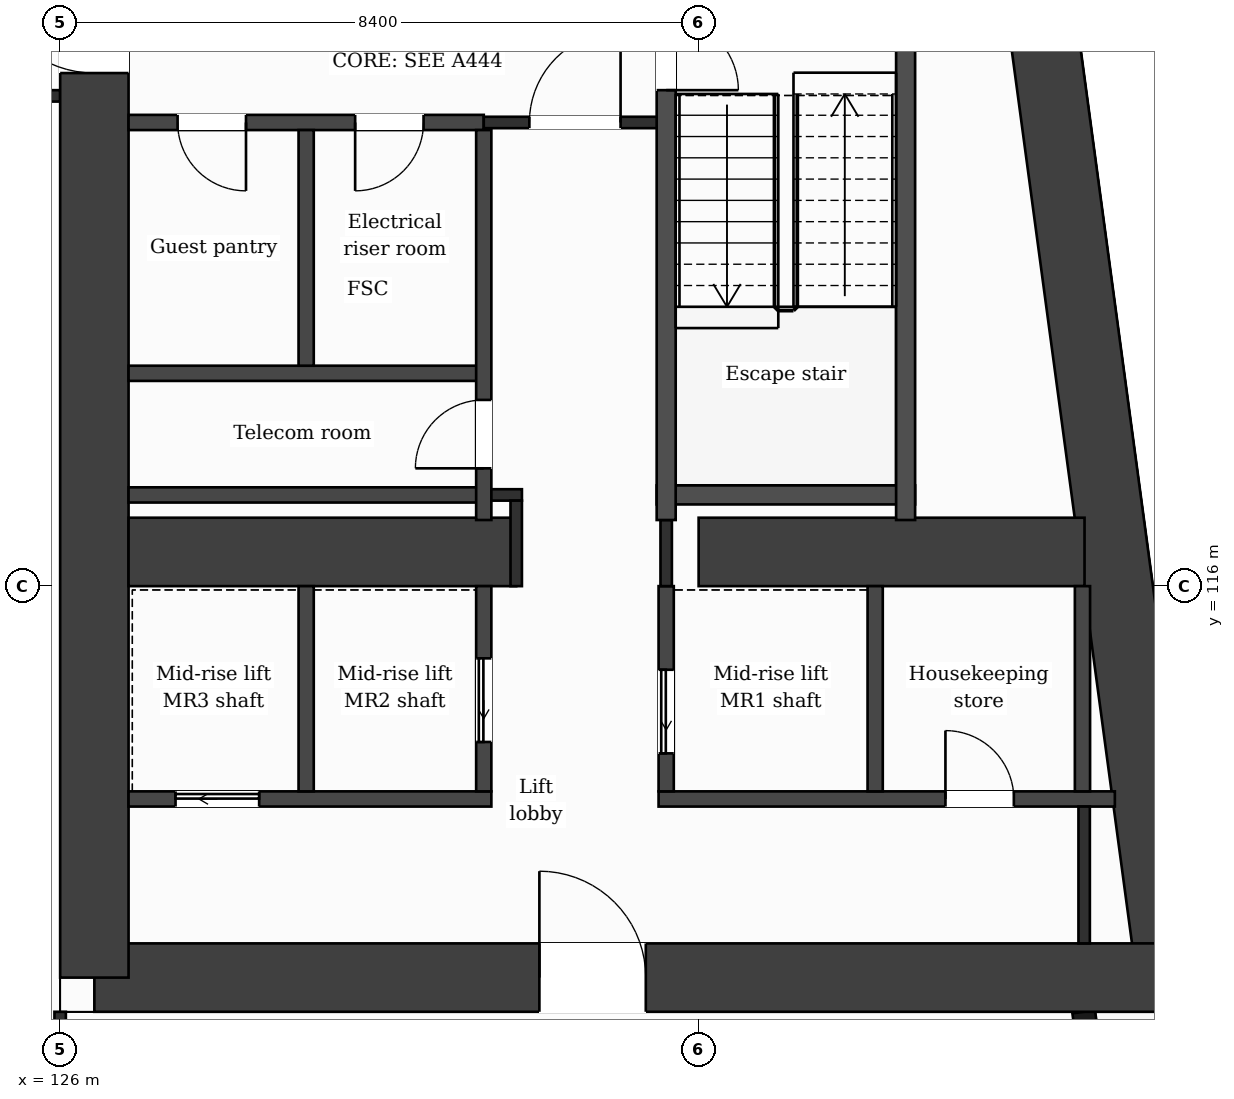
"""IFC4 building model, lengths in metres.
Left out: names, types, materials, properties, quantities, classifications, styles, units other than length and angle.
Written with IfcOpenShell. Run it as: python <this file> out.ifc"""

import sys

from ifc_helpers import new_model, si_unit, direction, frame, frame_2d, origin, place, context, subcontext, project, spatial, rectangle, extrude, element, fill, save


model = new_model("IFC4")
c1 = context("Model", 3, precision=1e-05, world=origin(), true_north=direction((0.0, 1.0)))
c2 = subcontext(c1, "Body", "Model", "MODEL_VIEW")
j1 = project(units=[si_unit("LENGTHUNIT", "METRE"), si_unit("PLANEANGLEUNIT", "RADIAN")], contexts=[c1])
p1 = place(None, origin())
s1 = spatial("IfcSite", under=j1, at=p1, CompositionType="ELEMENT")
p2 = place(p1, origin())
s2 = spatial("IfcBuilding", under=s1, at=p2, CompositionType="ELEMENT")
p3 = place(p2, frame((0.0, 0.0, 181.1)))
s3 = spatial("IfcBuildingStorey", under=s2, at=p3, CompositionType="ELEMENT", Elevation=181.1)
p4 = place(p3, frame((137.776, 131.95, 0.0), z_axis=(0.0, 0.0, 1.0), x_axis=(0.133421759112, -0.991059349482, 0.0)))
e1 = element("IfcWall", 1, at=p4, inside=s3, PredefinedType="SHEAR", context=c2, shape_type="SweptSolid", body=[
    extrude(rectangle(XDim=21.29, YDim=0.9, at=frame_2d((10.645, 0.0))), origin(), (0.0, 0.0, 1.0), 3.7),
])
p5 = place(p3, frame((140.616, 110.85, 0.0), z_axis=(0.0, 0.0, 1.0), x_axis=(-1.0, 0.0, 0.0)))
e2 = element("IfcWall", 2, at=p5, inside=s3, PredefinedType="SHEAR", context=c2, shape_type="SweptSolid", body=[
    extrude(rectangle(XDim=14.166, YDim=0.9, at=frame_2d((7.083, 0.0))), origin(), (0.0, 0.0, 1.0), 3.7),
])
p6 = place(p5, frame((6.911, 0.0, 0.0)))
e3 = element("IfcOpeningElement", 3, at=p6, cuts=e2, PredefinedType="OPENING", context=c2, shape_type="SweptSolid", body=[
    extrude(rectangle(XDim=1.4, YDim=2.1, at=frame_2d((0.7, 1.05))), frame((0.0, 0.46, 0.0), z_axis=(0.0, -1.0, 0.0), x_axis=(1.0, 0.0, 0.0)), (0.0, 0.0, 1.0), 0.92),
])
p7 = place(p3, frame((126.45, 110.85, 0.0), z_axis=(0.0, 0.0, 1.0), x_axis=(0.0, 1.0, 0.0)))
e4 = element("IfcWall", 4, at=p7, inside=s3, PredefinedType="SHEAR", context=c2, shape_type="SweptSolid", body=[
    extrude(rectangle(XDim=21.1, YDim=0.9, at=frame_2d((10.55, 0.0))), origin(), (0.0, 0.0, 1.0), 3.7),
])
p8 = place(p7, frame((11.9, 0.0, 0.0)))
e5 = element("IfcOpeningElement", 5, at=p8, cuts=e4, PredefinedType="OPENING", context=c2, shape_type="SweptSolid", body=[
    extrude(rectangle(XDim=1.4, YDim=2.1, at=frame_2d((0.7, 1.05))), frame((0.0, 0.46, 0.0), z_axis=(0.0, -1.0, 0.0), x_axis=(1.0, 0.0, 0.0)), (0.0, 0.0, 1.0), 0.92),
])
p9 = place(p3, frame((126.9, 116.45, 0.0), z_axis=(0.0, 0.0, 1.0), x_axis=(1.0, 0.0, 0.0)))
e6 = element("IfcWall", 6, at=p9, inside=s3, PredefinedType="SHEAR", context=c2, shape_type="SweptSolid", body=[
    extrude(rectangle(XDim=5.1, YDim=0.9, at=frame_2d((2.55, 0.0))), origin(), (0.0, 0.0, 1.0), 3.7),
])
p10 = place(p3, frame((134.4, 116.45, 0.0), z_axis=(0.0, 0.0, 1.0), x_axis=(1.0, 0.0, 0.0)))
e7 = element("IfcWall", 7, at=p10, inside=s3, PredefinedType="SHEAR", context=c2, shape_type="SweptSolid", body=[
    extrude(rectangle(XDim=5.077, YDim=0.9, at=frame_2d((2.539, 0.0))), origin(), (0.0, 0.0, 1.0), 3.7),
])
p11 = place(p3, frame((140.348, 103.85, 0.0), z_axis=(0.0, 0.0, 1.0), x_axis=(-0.133431549479, 0.991058031401, 0.0)))
e8 = element("IfcWall", 8, at=p11, inside=s3, PredefinedType="SOLIDWALL", context=c2, shape_type="SweptSolid", body=[
    extrude(rectangle(XDim=6.609, YDim=0.3, at=frame_2d((3.304, 0.0))), origin(), (0.0, 0.0, 1.0), 3.38),
])
p12 = place(p11, frame((0.737, 0.0, 0.9)))
e9 = element("IfcOpeningElement", 9, at=p12, cuts=e8, PredefinedType="OPENING", context=c2, shape_type="SweptSolid", body=[
    extrude(rectangle(XDim=1.2, YDim=2.1, at=frame_2d((0.6, 1.05))), frame((0.0, 0.16, 0.0), z_axis=(0.0, -1.0, 0.0), x_axis=(1.0, 0.0, 0.0)), (0.0, 0.0, 1.0), 0.32),
])
p13 = place(p11, frame((3.991, 0.0, 0.0)))
e10 = element("IfcOpeningElement", 10, at=p13, cuts=e8, PredefinedType="OPENING", context=c2, shape_type="SweptSolid", body=[
    extrude(rectangle(XDim=1.2, YDim=2.4, at=frame_2d((0.6, 1.2))), frame((0.0, 0.16, 0.0), z_axis=(0.0, -1.0, 0.0), x_axis=(1.0, 0.0, 0.0)), (0.0, 0.0, 1.0), 0.32),
])
p14 = place(p3, frame((126.9, 113.2, 0.0), z_axis=(0.0, 0.0, 1.0), x_axis=(1.0, 0.0, 0.0)))
e11 = element("IfcWall", 11, at=p14, inside=s3, PredefinedType="PARTITIONING", context=c2, shape_type="SweptSolid", body=[
    extrude(rectangle(XDim=4.773, YDim=0.2, at=frame_2d((2.387, 0.0))), origin(), (0.0, 0.0, 1.0), 3.38),
])
p15 = place(p14, frame((0.618, 0.0, 0.0)))
e12 = element("IfcOpeningElement", 12, at=p15, cuts=e11, PredefinedType="OPENING", context=c2, shape_type="SweptSolid", body=[
    extrude(rectangle(XDim=1.1, YDim=2.1, at=frame_2d((0.55, 1.05))), frame((0.0, 0.11, 0.0), z_axis=(0.0, -1.0, 0.0), x_axis=(1.0, 0.0, 0.0)), (0.0, 0.0, 1.0), 0.22),
])
p16 = place(p3, frame((133.873, 113.2, 0.0), z_axis=(0.0, 0.0, 1.0), x_axis=(1.0, 0.0, 0.0)))
e13 = element("IfcWall", 13, at=p16, inside=s3, PredefinedType="PARTITIONING", context=c2, shape_type="SweptSolid", body=[
    extrude(rectangle(XDim=6.003, YDim=0.2, at=frame_2d((3.001, 0.0))), origin(), (0.0, 0.0, 1.0), 3.38),
])
p17 = place(p16, frame((3.774, 0.0, 0.0)))
e14 = element("IfcOpeningElement", 14, at=p17, cuts=e13, PredefinedType="OPENING", context=c2, shape_type="SweptSolid", body=[
    extrude(rectangle(XDim=0.9, YDim=2.1, at=frame_2d((0.45, 1.05))), frame((0.0, 0.11, 0.0), z_axis=(0.0, -1.0, 0.0), x_axis=(1.0, 0.0, 0.0)), (0.0, 0.0, 1.0), 0.22),
])
p18 = place(p3, frame((126.9, 117.2, 0.0), z_axis=(0.0, 0.0, 1.0), x_axis=(1.0, 0.0, 0.0)))
e15 = element("IfcWall", 15, at=p18, inside=s3, PredefinedType="PARTITIONING", context=c2, shape_type="SweptSolid", body=[
    extrude(rectangle(XDim=4.673, YDim=0.2, at=frame_2d((2.336, 0.0))), origin(), (0.0, 0.0, 1.0), 3.38),
])
p19 = place(p3, frame((131.573, 117.2, 0.0), z_axis=(0.0, 0.0, 1.0), x_axis=(1.0, 0.0, 0.0)))
e16 = element("IfcWall", 16, at=p19, inside=s3, PredefinedType="PARTITIONING", context=c2, shape_type="SweptSolid", body=[
    extrude(rectangle(XDim=0.502, YDim=0.15, at=frame_2d((0.251, 0.0))), origin(), (0.0, 0.0, 1.0), 3.38),
])
p20 = place(p3, frame((133.848, 117.2, 0.0), z_axis=(0.0, 0.0, 1.0), x_axis=(1.0, 0.0, 0.0)))
e17 = element("IfcWall", 17, at=p20, inside=s3, PredefinedType="PARTITIONING", context=c2, shape_type="SweptSolid", body=[
    extrude(rectangle(XDim=3.4, YDim=0.25, at=frame_2d((1.7, 0.0))), origin(), (0.0, 0.0, 1.0), 3.38),
])
p21 = place(p3, frame((126.9, 118.8, 0.0), z_axis=(0.0, 0.0, 1.0), x_axis=(1.0, 0.0, 0.0)))
e18 = element("IfcWall", 18, at=p21, inside=s3, PredefinedType="PARTITIONING", context=c2, shape_type="SweptSolid", body=[
    extrude(rectangle(XDim=4.673, YDim=0.2, at=frame_2d((2.336, 0.0))), origin(), (0.0, 0.0, 1.0), 3.38),
])
p22 = place(p3, frame((126.9, 122.1, 0.0), z_axis=(0.0, 0.0, 1.0), x_axis=(1.0, 0.0, 0.0)))
e19 = element("IfcWall", 19, at=p22, inside=s3, PredefinedType="PARTITIONING", context=c2, shape_type="SweptSolid", body=[
    extrude(rectangle(XDim=4.673, YDim=0.2, at=frame_2d((2.336, 0.0))), origin(), (0.0, 0.0, 1.0), 3.38),
])
p23 = place(p22, frame((2.981, 0.0, 0.0)))
e20 = element("IfcOpeningElement", 20, at=p23, cuts=e19, PredefinedType="OPENING", context=c2, shape_type="SweptSolid", body=[
    extrude(rectangle(XDim=0.9, YDim=2.1, at=frame_2d((0.45, 1.05))), frame((0.0, 0.11, 0.0), z_axis=(0.0, -1.0, 0.0), x_axis=(1.0, 0.0, 0.0)), (0.0, 0.0, 1.0), 0.22),
])
p24 = place(p22, frame((0.645, 0.0, 0.0)))
e21 = element("IfcOpeningElement", 21, at=p24, cuts=e19, PredefinedType="OPENING", context=c2, shape_type="SweptSolid", body=[
    extrude(rectangle(XDim=0.9, YDim=2.1, at=frame_2d((0.45, 1.05))), frame((0.0, 0.11, 0.0), z_axis=(0.0, -1.0, 0.0), x_axis=(1.0, 0.0, 0.0)), (0.0, 0.0, 1.0), 0.22),
])
p25 = place(p3, frame((131.573, 122.1, 0.0), z_axis=(0.0, 0.0, 1.0), x_axis=(1.0, 0.0, 0.0)))
e22 = element("IfcWall", 22, at=p25, inside=s3, PredefinedType="PARTITIONING", context=c2, shape_type="SweptSolid", body=[
    extrude(rectangle(XDim=2.4, YDim=0.15, at=frame_2d((1.2, 0.0))), origin(), (0.0, 0.0, 1.0), 3.38),
])
p26 = place(p25, frame((0.6, 0.0, 0.0)))
e23 = element("IfcOpeningElement", 23, at=p26, cuts=e22, PredefinedType="OPENING", context=c2, shape_type="SweptSolid", body=[
    extrude(rectangle(XDim=1.2, YDim=2.1, at=frame_2d((0.6, 1.05))), frame((0.0, 0.085, 0.0), z_axis=(0.0, -1.0, 0.0), x_axis=(1.0, 0.0, 0.0)), (0.0, 0.0, 1.0), 0.17),
])
p27 = place(p3, frame((100.8, 122.45, 0.0), z_axis=(0.0, 0.0, 1.0), x_axis=(1.0, 0.0, 0.0)))
e24 = element("IfcWall", 24, at=p27, inside=s3, PredefinedType="PARTITIONING", context=c2, shape_type="SweptSolid", body=[
    extrude(rectangle(XDim=25.2, YDim=0.15, at=frame_2d((12.6, 0.0))), origin(), (0.0, 0.0, 1.0), 3.38),
])
p28 = place(p3, frame((126.0, 109.075, 0.0), z_axis=(0.0, 0.0, 1.0), x_axis=(0.0, 1.0, 0.0)))
e25 = element("IfcWall", 25, at=p28, inside=s3, PredefinedType="PARTITIONING", context=c2, shape_type="SweptSolid", body=[
    extrude(rectangle(XDim=1.325, YDim=0.15, at=frame_2d((0.663, 0.0))), origin(), (0.0, 0.0, 1.0), 3.38),
])
p29 = place(p3, frame((129.237, 113.3, 0.0), z_axis=(0.0, 0.0, 1.0), x_axis=(0.0, 1.0, 0.0)))
e26 = element("IfcWall", 26, at=p29, inside=s3, PredefinedType="PARTITIONING", context=c2, shape_type="SweptSolid", body=[
    extrude(rectangle(XDim=2.7, YDim=0.2, at=frame_2d((1.35, 0.0))), origin(), (0.0, 0.0, 1.0), 3.38),
])
p30 = place(p3, frame((129.237, 118.9, 0.0), z_axis=(0.0, 0.0, 1.0), x_axis=(0.0, 1.0, 0.0)))
e27 = element("IfcWall", 27, at=p30, inside=s3, PredefinedType="PARTITIONING", context=c2, shape_type="SweptSolid", body=[
    extrude(rectangle(XDim=3.1, YDim=0.2, at=frame_2d((1.55, 0.0))), origin(), (0.0, 0.0, 1.0), 3.38),
])
p31 = place(p3, frame((131.573, 113.3, 0.0), z_axis=(0.0, 0.0, 1.0), x_axis=(0.0, 1.0, 0.0)))
e28 = element("IfcWall", 28, at=p31, inside=s3, PredefinedType="PARTITIONING", context=c2, shape_type="SweptSolid", body=[
    extrude(rectangle(XDim=2.7, YDim=0.2, at=frame_2d((1.35, 0.0))), origin(), (0.0, 0.0, 1.0), 3.38),
])
p32 = place(p31, frame((0.65, 0.0, 0.0)))
e29 = element("IfcOpeningElement", 29, at=p32, cuts=e28, PredefinedType="OPENING", context=c2, shape_type="SweptSolid", body=[
    extrude(rectangle(XDim=1.1, YDim=2.1, at=frame_2d((0.55, 1.05))), frame((0.0, 0.11, 0.0), z_axis=(0.0, -1.0, 0.0), x_axis=(1.0, 0.0, 0.0)), (0.0, 0.0, 1.0), 0.22),
])
p33 = place(p3, frame((131.573, 116.87, 0.0), z_axis=(0.0, 0.0, 1.0), x_axis=(0.0, 1.0, 0.0)))
e30 = element("IfcWall", 30, at=p33, inside=s3, PredefinedType="PARTITIONING", context=c2, shape_type="SweptSolid", body=[
    extrude(rectangle(XDim=5.13, YDim=0.2, at=frame_2d((2.565, 0.0))), origin(), (0.0, 0.0, 1.0), 3.38),
])
p34 = place(p33, frame((0.68, 0.0, 0.0)))
e31 = element("IfcOpeningElement", 31, at=p34, cuts=e30, PredefinedType="OPENING", context=c2, shape_type="SweptSolid", body=[
    extrude(rectangle(XDim=0.9, YDim=2.1, at=frame_2d((0.45, 1.05))), frame((0.0, 0.11, 0.0), z_axis=(0.0, -1.0, 0.0), x_axis=(1.0, 0.0, 0.0)), (0.0, 0.0, 1.0), 0.22),
])
p35 = place(p3, frame((132.0, 116.0, 0.0), z_axis=(0.0, 0.0, 1.0), x_axis=(0.0, 1.0, 0.0)))
e32 = element("IfcWall", 32, at=p35, inside=s3, PredefinedType="PARTITIONING", context=c2, shape_type="SweptSolid", body=[
    extrude(rectangle(XDim=1.125, YDim=0.15, at=frame_2d((0.562, 0.0))), origin(), (0.0, 0.0, 1.0), 3.38),
])
p36 = place(p3, frame((133.973, 113.3, 0.0), z_axis=(0.0, 0.0, 1.0), x_axis=(0.0, 1.0, 0.0)))
e33 = element("IfcWall", 33, at=p36, inside=s3, PredefinedType="PARTITIONING", context=c2, shape_type="SweptSolid", body=[
    extrude(rectangle(XDim=2.7, YDim=0.2, at=frame_2d((1.35, 0.0))), origin(), (0.0, 0.0, 1.0), 3.38),
])
p37 = place(p36, frame((0.5, 0.0, 0.0)))
e34 = element("IfcOpeningElement", 34, at=p37, cuts=e33, PredefinedType="OPENING", context=c2, shape_type="SweptSolid", body=[
    extrude(rectangle(XDim=1.1, YDim=2.1, at=frame_2d((0.55, 1.05))), frame((0.0, 0.11, 0.0), z_axis=(0.0, -1.0, 0.0), x_axis=(1.0, 0.0, 0.0)), (0.0, 0.0, 1.0), 0.22),
])
p38 = place(p3, frame((133.973, 116.0, 0.0), z_axis=(0.0, 0.0, 1.0), x_axis=(0.0, 1.0, 0.0)))
e35 = element("IfcWall", 35, at=p38, inside=s3, PredefinedType="PARTITIONING", context=c2, shape_type="SweptSolid", body=[
    extrude(rectangle(XDim=0.87, YDim=0.15, at=frame_2d((0.435, 0.0))), origin(), (0.0, 0.0, 1.0), 3.38),
])
p39 = place(p3, frame((133.973, 116.87, 0.0), z_axis=(0.0, 0.0, 1.0), x_axis=(0.0, 1.0, 0.0)))
e36 = element("IfcWall", 36, at=p39, inside=s3, PredefinedType="PARTITIONING", context=c2, shape_type="SweptSolid", body=[
    extrude(rectangle(XDim=6.955, YDim=0.25, at=frame_2d((3.478, 0.0))), origin(), (0.0, 0.0, 1.0), 3.38),
])
p40 = place(p39, frame((5.655, 0.0, 0.0)))
e37 = element("IfcOpeningElement", 37, at=p40, cuts=e36, PredefinedType="OPENING", context=c2, shape_type="SweptSolid", body=[
    extrude(rectangle(XDim=0.95, YDim=2.1, at=frame_2d((0.475, 1.05))), frame((0.0, 0.135, 0.0), z_axis=(0.0, -1.0, 0.0), x_axis=(1.0, 0.0, 0.0)), (0.0, 0.0, 1.0), 0.27),
])
p41 = place(p3, frame((136.722, 113.3, 0.0), z_axis=(0.0, 0.0, 1.0), x_axis=(0.0, 1.0, 0.0)))
e38 = element("IfcWall", 38, at=p41, inside=s3, PredefinedType="PARTITIONING", context=c2, shape_type="SweptSolid", body=[
    extrude(rectangle(XDim=2.7, YDim=0.2, at=frame_2d((1.35, 0.0))), origin(), (0.0, 0.0, 1.0), 3.38),
])
p42 = place(p3, frame((137.123, 116.87, 0.0), z_axis=(0.0, 0.0, 1.0), x_axis=(0.0, 1.0, 0.0)))
e39 = element("IfcWall", 39, at=p42, inside=s3, PredefinedType="PARTITIONING", context=c2, shape_type="SweptSolid", body=[
    extrude(rectangle(XDim=6.955, YDim=0.25, at=frame_2d((3.478, 0.0))), origin(), (0.0, 0.0, 1.0), 3.38),
])
p43 = place(p3, frame((139.45, 113.3, 0.0), z_axis=(0.0, 0.0, 1.0), x_axis=(0.0, 1.0, 0.0)))
e40 = element("IfcWall", 40, at=p43, inside=s3, PredefinedType="PARTITIONING", context=c2, shape_type="SweptSolid", body=[
    extrude(rectangle(XDim=2.7, YDim=0.2, at=frame_2d((1.35, 0.0))), origin(), (0.0, 0.0, 1.0), 3.38),
])
p44 = place(p3, frame((139.472, 111.3, 0.0), z_axis=(0.0, 0.0, 1.0), x_axis=(0.0, 1.0, 0.0)))
e41 = element("IfcWall", 41, at=p44, inside=s3, PredefinedType="PARTITIONING", context=c2, shape_type="SweptSolid", body=[
    extrude(rectangle(XDim=1.8, YDim=0.15, at=frame_2d((0.9, 0.0))), origin(), (0.0, 0.0, 1.0), 3.38),
])
p45 = place(p26, origin())
e42 = element("IfcDoor", 42, at=p45, inside=s3, OperationType="SINGLE_SWING_RIGHT", PredefinedType="DOOR", context=c2, shape_type="SweptSolid", body=[
    extrude(rectangle(XDim=1.2, YDim=2.1, at=frame_2d((0.6, 1.05))), frame((0.0, 0.025, 0.0), z_axis=(0.0, -1.0, 0.0), x_axis=(1.0, 0.0, 0.0)), (0.0, 0.0, 1.0), 0.05),
])
fill(e23, e42)
p46 = place(p23, origin())
e43 = element("IfcDoor", 43, at=p46, inside=s3, OperationType="SINGLE_SWING_LEFT", PredefinedType="DOOR", context=c2, shape_type="SweptSolid", body=[
    extrude(rectangle(XDim=0.9, YDim=2.1, at=frame_2d((0.45, 1.05))), frame((0.0, 0.025, 0.0), z_axis=(0.0, -1.0, 0.0), x_axis=(1.0, 0.0, 0.0)), (0.0, 0.0, 1.0), 0.05),
])
fill(e20, e43)
p47 = place(p24, origin())
e44 = element("IfcDoor", 44, at=p47, inside=s3, OperationType="SINGLE_SWING_RIGHT", PredefinedType="DOOR", context=c2, shape_type="SweptSolid", body=[
    extrude(rectangle(XDim=0.9, YDim=2.1, at=frame_2d((0.45, 1.05))), frame((0.0, 0.025, 0.0), z_axis=(0.0, -1.0, 0.0), x_axis=(1.0, 0.0, 0.0)), (0.0, 0.0, 1.0), 0.05),
])
fill(e21, e44)
p48 = place(p40, origin())
e45 = element("IfcDoor", 45, at=p48, inside=s3, OperationType="SINGLE_SWING_LEFT", PredefinedType="DOOR", context=c2, shape_type="SweptSolid", body=[
    extrude(rectangle(XDim=0.95, YDim=2.1, at=frame_2d((0.475, 1.05))), frame((0.0, 0.025, 0.0), z_axis=(0.0, -1.0, 0.0), x_axis=(1.0, 0.0, 0.0)), (0.0, 0.0, 1.0), 0.05),
])
fill(e37, e45)
p49 = place(p34, origin())
e46 = element("IfcDoor", 46, at=p49, inside=s3, OperationType="SINGLE_SWING_LEFT", PredefinedType="DOOR", context=c2, shape_type="SweptSolid", body=[
    extrude(rectangle(XDim=0.9, YDim=2.1, at=frame_2d((0.45, 1.05))), frame((0.0, 0.025, 0.0), z_axis=(0.0, -1.0, 0.0), x_axis=(1.0, 0.0, 0.0)), (0.0, 0.0, 1.0), 0.05),
])
fill(e31, e46)
p50 = place(p37, origin())
e47 = element("IfcDoor", 47, at=p50, inside=s3, OperationType="SLIDING_TO_LEFT", PredefinedType="DOOR", context=c2, shape_type="SweptSolid", body=[
    extrude(rectangle(XDim=1.1, YDim=2.1, at=frame_2d((0.55, 1.05))), frame((0.0, 0.025, 0.0), z_axis=(0.0, -1.0, 0.0), x_axis=(1.0, 0.0, 0.0)), (0.0, 0.0, 1.0), 0.05),
])
fill(e34, e47)
p51 = place(p32, origin())
e48 = element("IfcDoor", 48, at=p51, inside=s3, OperationType="SLIDING_TO_LEFT", PredefinedType="DOOR", context=c2, shape_type="SweptSolid", body=[
    extrude(rectangle(XDim=1.1, YDim=2.1, at=frame_2d((0.55, 1.05))), frame((0.0, 0.025, 0.0), z_axis=(0.0, -1.0, 0.0), x_axis=(1.0, 0.0, 0.0)), (0.0, 0.0, 1.0), 0.05),
])
fill(e29, e48)
p52 = place(p15, origin())
e49 = element("IfcDoor", 49, at=p52, inside=s3, OperationType="SLIDING_TO_LEFT", PredefinedType="DOOR", context=c2, shape_type="SweptSolid", body=[
    extrude(rectangle(XDim=1.1, YDim=2.1, at=frame_2d((0.55, 1.05))), frame((0.0, 0.025, 0.0), z_axis=(0.0, -1.0, 0.0), x_axis=(1.0, 0.0, 0.0)), (0.0, 0.0, 1.0), 0.05),
])
fill(e12, e49)
p53 = place(p17, origin())
e50 = element("IfcDoor", 50, at=p53, inside=s3, OperationType="SINGLE_SWING_LEFT", PredefinedType="DOOR", context=c2, shape_type="SweptSolid", body=[
    extrude(rectangle(XDim=0.9, YDim=2.1, at=frame_2d((0.45, 1.05))), frame((0.0, 0.025, 0.0), z_axis=(0.0, -1.0, 0.0), x_axis=(1.0, 0.0, 0.0)), (0.0, 0.0, 1.0), 0.05),
])
fill(e14, e50)
p54 = place(p6, origin())
e51 = element("IfcDoor", 51, at=p54, inside=s3, OperationType="SINGLE_SWING_RIGHT", PredefinedType="DOOR", context=c2, shape_type="SweptSolid", body=[
    extrude(rectangle(XDim=1.4, YDim=2.1, at=frame_2d((0.7, 1.05))), frame((0.0, 0.025, 0.0), z_axis=(0.0, -1.0, 0.0), x_axis=(1.0, 0.0, 0.0)), (0.0, 0.0, 1.0), 0.05),
])
fill(e3, e51)
p55 = place(p8, origin())
e52 = element("IfcDoor", 52, at=p55, inside=s3, OperationType="SINGLE_SWING_RIGHT", PredefinedType="DOOR", context=c2, shape_type="SweptSolid", body=[
    extrude(rectangle(XDim=1.4, YDim=2.1, at=frame_2d((0.7, 1.05))), frame((0.0, 0.025, 0.0), z_axis=(0.0, -1.0, 0.0), x_axis=(1.0, 0.0, 0.0)), (0.0, 0.0, 1.0), 0.05),
])
fill(e5, e52)
save(model, sys.argv[1])
